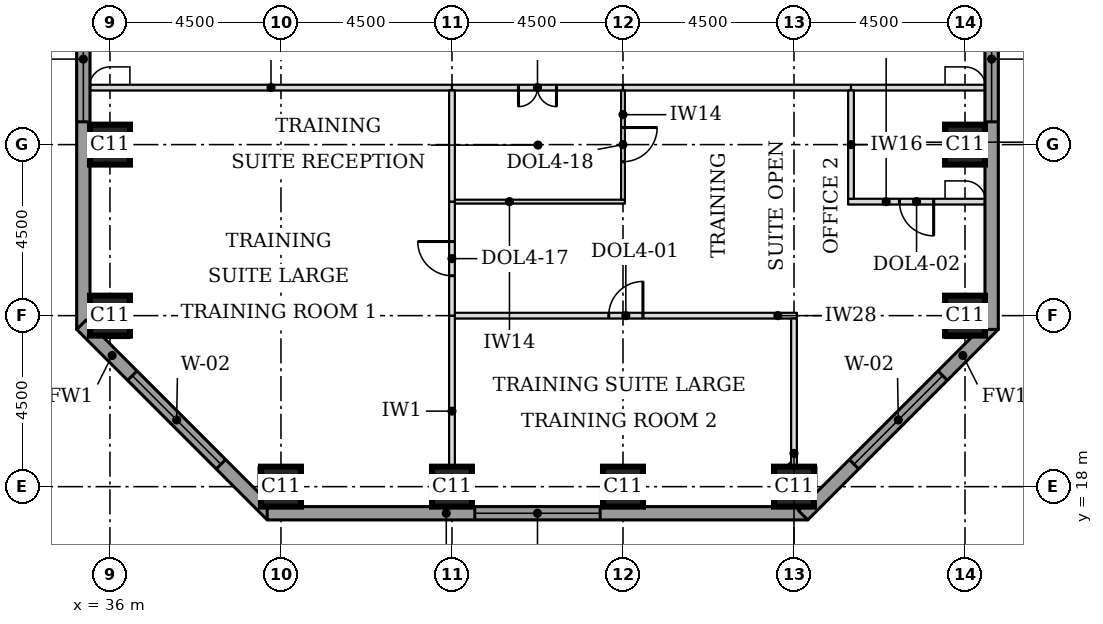
"""IFC4 building model, lengths in metres.
Left out: names, types, materials, properties, quantities, classifications, styles, units other than length and angle.
Written with IfcOpenShell. Run it as: python <this file> out.ifc"""

import sys

from ifc_helpers import new_model, si_unit, direction, frame, frame_2d, origin, origin_2d, place, context, subcontext, project, spatial, rectangle, extrude, element, fill, save


model = new_model("IFC4")
c1 = context("Model", 3, precision=1e-05, world=origin(), true_north=direction((0.0, 1.0)))
c2 = subcontext(c1, "Body", "Model", "MODEL_VIEW")
j1 = project(units=[si_unit("LENGTHUNIT", "METRE"), si_unit("PLANEANGLEUNIT", "RADIAN")], contexts=[c1])
p1 = place(None, origin())
s1 = spatial("IfcSite", under=j1, at=p1, CompositionType="ELEMENT")
p2 = place(p1, origin())
s2 = spatial("IfcBuilding", under=s1, at=p2, CompositionType="ELEMENT")
p3 = place(p2, frame((0.0, 0.0, 101.1)))
s3 = spatial("IfcBuildingStorey", under=s2, at=p3, CompositionType="ELEMENT", Elevation=101.1)
for number, where, z_axis, x_axis in (
    (1, (40.5, 18.0, 0.0), (0.0, 0.0, 1.0), (1.0, 0.0, 0.0)),
    (2, (45.0, 18.0, 0.0), (0.0, 0.0, 1.0), (1.0, 0.0, 0.0)),
    (3, (49.5, 18.0, 0.0), (0.0, 0.0, 1.0), (1.0, 0.0, 0.0)),
    (4, (54.0, 18.0, 0.0), (0.0, 0.0, 1.0), (1.0, 0.0, 0.0)),
    (5, (36.0, 22.5, 0.0), (0.0, 0.0, 1.0), (1.0, 0.0, 0.0)),
    (6, (58.5, 22.5, 0.0), (0.0, 0.0, 1.0), (1.0, 0.0, 0.0)),
    (7, (36.0, 27.0, 0.0), (0.0, 0.0, 1.0), (1.0, 0.0, 0.0)),
    (8, (58.5, 27.0, 0.0), (0.0, 0.0, 1.0), (1.0, 0.0, 0.0)),
):
    element("IfcColumn", number, at=place(p3, frame(where, z_axis=z_axis, x_axis=x_axis)), inside=s3, PredefinedType="COLUMN", context=c2, shape_type="SweptSolid", body=[
        extrude(rectangle(XDim=1.05, YDim=1.05, at=origin_2d()), origin(), (0.0, 0.0, 1.0), 3.7),
    ])
p4 = place(p3, frame((35.3, 39.975, 0.0), z_axis=(0.0, 0.0, 1.0), x_axis=(0.0, -1.0, 0.0)))
e9 = element("IfcWall", 9, at=p4, inside=s3, PredefinedType="STANDARD", context=c2, shape_type="SweptSolid", body=[
    extrude(rectangle(XDim=17.837, YDim=0.35, at=frame_2d((8.919, 0.0))), origin(), (0.0, 0.0, 1.0), 3.525),
])
p5 = place(p4, frame((0.5, 0.0, 0.9)))
e10 = element("IfcOpeningElement", 10, at=p5, cuts=e9, PredefinedType="OPENING", context=c2, shape_type="SweptSolid", body=[
    extrude(rectangle(XDim=3.3, YDim=1.9, at=frame_2d((1.65, 0.95))), frame((0.0, 0.185, 0.0), z_axis=(0.0, -1.0, 0.0), x_axis=(1.0, 0.0, 0.0)), (0.0, 0.0, 1.0), 0.37),
])
p6 = place(p4, frame((9.075, 0.0, 0.9)))
e11 = element("IfcOpeningElement", 11, at=p6, cuts=e9, PredefinedType="OPENING", context=c2, shape_type="SweptSolid", body=[
    extrude(rectangle(XDim=3.3, YDim=1.9, at=frame_2d((1.65, 0.95))), frame((0.0, 0.185, 0.0), z_axis=(0.0, -1.0, 0.0), x_axis=(1.0, 0.0, 0.0)), (0.0, 0.0, 1.0), 0.37),
])
p7 = place(p3, frame((35.249, 22.261, 0.0), z_axis=(0.0, 0.0, 1.0), x_axis=(0.707106781187, -0.707106781187, 0.0)))
e12 = element("IfcWall", 12, at=p7, inside=s3, PredefinedType="STANDARD", context=c2, shape_type="SweptSolid", body=[
    extrude(rectangle(XDim=7.089, YDim=0.35, at=frame_2d((3.544, 0.0))), origin(), (0.0, 0.0, 1.0), 3.525),
])
p8 = place(p7, frame((1.894, 0.0, 0.9)))
e13 = element("IfcOpeningElement", 13, at=p8, cuts=e12, PredefinedType="OPENING", context=c2, shape_type="SweptSolid", body=[
    extrude(rectangle(XDim=3.3, YDim=1.9, at=frame_2d((1.65, 0.95))), frame((0.0, 0.185, 0.0), z_axis=(0.0, -1.0, 0.0), x_axis=(1.0, 0.0, 0.0)), (0.0, 0.0, 1.0), 0.37),
])
p9 = place(p3, frame((40.138, 17.3, 0.0), z_axis=(0.0, 0.0, 1.0), x_axis=(1.0, 0.0, 0.0)))
e14 = element("IfcWall", 14, at=p9, inside=s3, PredefinedType="STANDARD", context=c2, shape_type="SweptSolid", body=[
    extrude(rectangle(XDim=14.225, YDim=0.35, at=frame_2d((7.112, 0.0))), origin(), (0.0, 0.0, 1.0), 3.525),
])
p10 = place(p9, frame((5.462, 0.0, 0.9)))
e15 = element("IfcOpeningElement", 15, at=p10, cuts=e14, PredefinedType="OPENING", context=c2, shape_type="SweptSolid", body=[
    extrude(rectangle(XDim=3.3, YDim=1.9, at=frame_2d((1.65, 0.95))), frame((0.0, 0.185, 0.0), z_axis=(0.0, -1.0, 0.0), x_axis=(1.0, 0.0, 0.0)), (0.0, 0.0, 1.0), 0.37),
])
p11 = place(p3, frame((54.239, 17.249, 0.0), z_axis=(0.0, 0.0, 1.0), x_axis=(0.707106781187, 0.707106781187, 0.0)))
e16 = element("IfcWall", 16, at=p11, inside=s3, PredefinedType="STANDARD", context=c2, shape_type="SweptSolid", body=[
    extrude(rectangle(XDim=7.089, YDim=0.35, at=frame_2d((3.544, 0.0))), origin(), (0.0, 0.0, 1.0), 3.525),
])
p12 = place(p11, frame((1.894, 0.0, 0.9)))
e17 = element("IfcOpeningElement", 17, at=p12, cuts=e16, PredefinedType="OPENING", context=c2, shape_type="SweptSolid", body=[
    extrude(rectangle(XDim=3.3, YDim=1.9, at=frame_2d((1.65, 0.95))), frame((0.0, 0.185, 0.0), z_axis=(0.0, -1.0, 0.0), x_axis=(1.0, 0.0, 0.0)), (0.0, 0.0, 1.0), 0.37),
])
p13 = place(p3, frame((59.2, 22.138, 0.0), z_axis=(0.0, 0.0, 1.0), x_axis=(0.0, 1.0, 0.0)))
e18 = element("IfcWall", 18, at=p13, inside=s3, PredefinedType="STANDARD", context=c2, shape_type="SweptSolid", body=[
    extrude(rectangle(XDim=17.837, YDim=0.35, at=frame_2d((8.919, 0.0))), origin(), (0.0, 0.0, 1.0), 3.525),
])
p14 = place(p13, frame((5.462, 0.0, 0.9)))
e19 = element("IfcOpeningElement", 19, at=p14, cuts=e18, PredefinedType="OPENING", context=c2, shape_type="SweptSolid", body=[
    extrude(rectangle(XDim=3.3, YDim=1.9, at=frame_2d((1.65, 0.95))), frame((0.0, 0.185, 0.0), z_axis=(0.0, -1.0, 0.0), x_axis=(1.0, 0.0, 0.0)), (0.0, 0.0, 1.0), 0.37),
])
p15 = place(p13, frame((14.037, 0.0, 0.9)))
e20 = element("IfcOpeningElement", 20, at=p15, cuts=e18, PredefinedType="OPENING", context=c2, shape_type="SweptSolid", body=[
    extrude(rectangle(XDim=3.3, YDim=1.9, at=frame_2d((1.65, 0.95))), frame((0.0, 0.185, 0.0), z_axis=(0.0, -1.0, 0.0), x_axis=(1.0, 0.0, 0.0)), (0.0, 0.0, 1.0), 0.37),
])
p16 = place(p3, frame((45.075, 22.5, 0.0), z_axis=(0.0, 0.0, 1.0), x_axis=(1.0, 0.0, 0.0)))
e21 = element("IfcWall", 21, at=p16, inside=s3, PredefinedType="PARTITIONING", context=c2, shape_type="SweptSolid", body=[
    extrude(rectangle(XDim=9.0, YDim=0.15, at=frame_2d((4.5, 0.0))), origin(), (0.0, 0.0, 1.0), 2.55),
])
p17 = place(p16, frame((4.05, 0.0, 0.0)))
e22 = element("IfcOpeningElement", 22, at=p17, cuts=e21, PredefinedType="OPENING", context=c2, shape_type="SweptSolid", body=[
    extrude(rectangle(XDim=0.9, YDim=2.1, at=frame_2d((0.45, 1.05))), frame((0.0, 0.085, 0.0), z_axis=(0.0, -1.0, 0.0), x_axis=(1.0, 0.0, 0.0)), (0.0, 0.0, 1.0), 0.17),
])
p18 = place(p3, frame((45.075, 25.5, 0.0), z_axis=(0.0, 0.0, 1.0), x_axis=(1.0, 0.0, 0.0)))
e23 = element("IfcWall", 23, at=p18, inside=s3, PredefinedType="PARTITIONING", context=c2, shape_type="SweptSolid", body=[
    extrude(rectangle(XDim=4.475, YDim=0.1, at=frame_2d((2.238, 0.0))), origin(), (0.0, 0.0, 1.0), 3.55),
])
p19 = place(p3, frame((55.425, 25.5, 0.0), z_axis=(0.0, 0.0, 1.0), x_axis=(1.0, 0.0, 0.0)))
e24 = element("IfcWall", 24, at=p19, inside=s3, PredefinedType="PARTITIONING", context=c2, shape_type="SweptSolid", body=[
    extrude(rectangle(XDim=3.6, YDim=0.15, at=frame_2d((1.8, 0.0))), origin(), (0.0, 0.0, 1.0), 3.55),
])
p20 = place(p19, frame((1.35, 0.0, 0.0)))
e25 = element("IfcOpeningElement", 25, at=p20, cuts=e24, PredefinedType="OPENING", context=c2, shape_type="SweptSolid", body=[
    extrude(rectangle(XDim=0.9, YDim=2.1, at=frame_2d((0.45, 1.05))), frame((0.0, 0.085, 0.0), z_axis=(0.0, -1.0, 0.0), x_axis=(1.0, 0.0, 0.0)), (0.0, 0.0, 1.0), 0.17),
])
p21 = place(p3, frame((35.475, 28.5, 0.0), z_axis=(0.0, 0.0, 1.0), x_axis=(1.0, 0.0, 0.0)))
e26 = element("IfcWall", 26, at=p21, inside=s3, PredefinedType="PARTITIONING", context=c2, shape_type="SweptSolid", body=[
    extrude(rectangle(XDim=9.525, YDim=0.15, at=frame_2d((4.762, 0.0))), origin(), (0.0, 0.0, 1.0), 3.55),
])
p22 = place(p3, frame((45.0, 28.5, 0.0), z_axis=(0.0, 0.0, 1.0), x_axis=(1.0, 0.0, 0.0)))
e27 = element("IfcWall", 27, at=p22, inside=s3, PredefinedType="PARTITIONING", context=c2, shape_type="SweptSolid", body=[
    extrude(rectangle(XDim=4.5, YDim=0.15, at=frame_2d((2.25, 0.0))), origin(), (0.0, 0.0, 1.0), 3.55),
])
p23 = place(p22, frame((1.75, 0.0, 0.0)))
e28 = element("IfcOpeningElement", 28, at=p23, cuts=e27, PredefinedType="OPENING", context=c2, shape_type="SweptSolid", body=[
    extrude(rectangle(XDim=1.0, YDim=2.1, at=frame_2d((0.5, 1.05))), frame((0.0, 0.085, 0.0), z_axis=(0.0, -1.0, 0.0), x_axis=(1.0, 0.0, 0.0)), (0.0, 0.0, 1.0), 0.17),
])
p24 = place(p3, frame((49.5, 28.5, 0.0), z_axis=(0.0, 0.0, 1.0), x_axis=(1.0, 0.0, 0.0)))
e29 = element("IfcWall", 29, at=p24, inside=s3, PredefinedType="PARTITIONING", context=c2, shape_type="SweptSolid", body=[
    extrude(rectangle(XDim=6.0, YDim=0.15, at=frame_2d((3.0, 0.0))), origin(), (0.0, 0.0, 1.0), 3.55),
])
p25 = place(p3, frame((55.5, 28.5, 0.0), z_axis=(0.0, 0.0, 1.0), x_axis=(1.0, 0.0, 0.0)))
e30 = element("IfcWall", 30, at=p25, inside=s3, PredefinedType="PARTITIONING", context=c2, shape_type="SweptSolid", body=[
    extrude(rectangle(XDim=3.525, YDim=0.15, at=frame_2d((1.762, 0.0))), origin(), (0.0, 0.0, 1.0), 3.55),
])
p26 = place(p3, frame((45.0, 17.475, 0.0), z_axis=(0.0, 0.0, 1.0), x_axis=(0.0, 1.0, 0.0)))
e31 = element("IfcWall", 31, at=p26, inside=s3, PredefinedType="PARTITIONING", context=c2, shape_type="SweptSolid", body=[
    extrude(rectangle(XDim=5.025, YDim=0.15, at=frame_2d((2.512, 0.0))), origin(), (0.0, 0.0, 1.0), 3.55),
])
p27 = place(p3, frame((54.0, 18.525, 0.0), z_axis=(0.0, 0.0, 1.0), x_axis=(0.0, 1.0, 0.0)))
e32 = element("IfcWall", 32, at=p27, inside=s3, PredefinedType="PARTITIONING", context=c2, shape_type="SweptSolid", body=[
    extrude(rectangle(XDim=3.9, YDim=0.15, at=frame_2d((1.95, 0.0))), origin(), (0.0, 0.0, 1.0), 3.55),
])
p28 = place(p3, frame((45.0, 22.5, 0.0), z_axis=(0.0, 0.0, 1.0), x_axis=(0.0, 1.0, 0.0)))
e33 = element("IfcWall", 33, at=p28, inside=s3, PredefinedType="PARTITIONING", context=c2, shape_type="SweptSolid", body=[
    extrude(rectangle(XDim=3.0, YDim=0.15, at=frame_2d((1.5, 0.0))), origin(), (0.0, 0.0, 1.0), 3.55),
])
p29 = place(p28, frame((1.05, 0.0, 0.0)))
e34 = element("IfcOpeningElement", 34, at=p29, cuts=e33, PredefinedType="OPENING", context=c2, shape_type="SweptSolid", body=[
    extrude(rectangle(XDim=0.9, YDim=2.1, at=frame_2d((0.45, 1.05))), frame((0.0, 0.085, 0.0), z_axis=(0.0, -1.0, 0.0), x_axis=(1.0, 0.0, 0.0)), (0.0, 0.0, 1.0), 0.17),
])
p30 = place(p3, frame((45.0, 25.5, 0.0), z_axis=(0.0, 0.0, 1.0), x_axis=(0.0, 1.0, 0.0)))
e35 = element("IfcWall", 35, at=p30, inside=s3, PredefinedType="PARTITIONING", context=c2, shape_type="SweptSolid", body=[
    extrude(rectangle(XDim=2.925, YDim=0.15, at=frame_2d((1.462, 0.0))), origin(), (0.0, 0.0, 1.0), 3.55),
])
p31 = place(p3, frame((49.5, 25.55, 0.0), z_axis=(0.0, 0.0, 1.0), x_axis=(0.0, 1.0, 0.0)))
e36 = element("IfcWall", 36, at=p31, inside=s3, PredefinedType="PARTITIONING", context=c2, shape_type="SweptSolid", body=[
    extrude(rectangle(XDim=2.875, YDim=0.1, at=frame_2d((1.438, 0.0))), origin(), (0.0, 0.0, 1.0), 3.55),
])
p32 = place(p31, frame((1.0, 0.0, 0.0)))
e37 = element("IfcOpeningElement", 37, at=p32, cuts=e36, PredefinedType="OPENING", context=c2, shape_type="SweptSolid", body=[
    extrude(rectangle(XDim=0.9, YDim=2.1, at=frame_2d((0.45, 1.05))), frame((0.0, 0.06, 0.0), z_axis=(0.0, -1.0, 0.0), x_axis=(1.0, 0.0, 0.0)), (0.0, 0.0, 1.0), 0.12),
])
p33 = place(p3, frame((55.5, 25.575, 0.0), z_axis=(0.0, 0.0, 1.0), x_axis=(0.0, 1.0, 0.0)))
e38 = element("IfcWall", 38, at=p33, inside=s3, PredefinedType="PARTITIONING", context=c2, shape_type="SweptSolid", body=[
    extrude(rectangle(XDim=2.85, YDim=0.15, at=frame_2d((1.425, 0.0))), origin(), (0.0, 0.0, 1.0), 3.55),
])
p34 = place(p6, origin())
e39 = element("IfcWindow", 39, at=p34, inside=s3, PartitioningType="SINGLE_PANEL", PredefinedType="WINDOW", context=c2, shape_type="SweptSolid", body=[
    extrude(rectangle(XDim=3.3, YDim=1.9, at=frame_2d((1.65, 0.95))), frame((0.0, 0.085, 0.0), z_axis=(0.0, -1.0, 0.0), x_axis=(1.0, 0.0, 0.0)), (0.0, 0.0, 1.0), 0.06),
])
fill(e11, e39)
p35 = place(p8, origin())
e40 = element("IfcWindow", 40, at=p35, inside=s3, PartitioningType="SINGLE_PANEL", PredefinedType="WINDOW", context=c2, shape_type="SweptSolid", body=[
    extrude(rectangle(XDim=3.3, YDim=1.9, at=frame_2d((1.65, 0.95))), frame((0.0, 0.085, 0.0), z_axis=(0.0, -1.0, 0.0), x_axis=(1.0, 0.0, 0.0)), (0.0, 0.0, 1.0), 0.06),
])
fill(e13, e40)
p36 = place(p10, origin())
e41 = element("IfcWindow", 41, at=p36, inside=s3, PartitioningType="SINGLE_PANEL", PredefinedType="WINDOW", context=c2, shape_type="SweptSolid", body=[
    extrude(rectangle(XDim=3.3, YDim=1.9, at=frame_2d((1.65, 0.95))), frame((0.0, 0.085, 0.0), z_axis=(0.0, -1.0, 0.0), x_axis=(1.0, 0.0, 0.0)), (0.0, 0.0, 1.0), 0.06),
])
fill(e15, e41)
p37 = place(p12, origin())
e42 = element("IfcWindow", 42, at=p37, inside=s3, PartitioningType="SINGLE_PANEL", PredefinedType="WINDOW", context=c2, shape_type="SweptSolid", body=[
    extrude(rectangle(XDim=3.3, YDim=1.9, at=frame_2d((1.65, 0.95))), frame((0.0, 0.085, 0.0), z_axis=(0.0, -1.0, 0.0), x_axis=(1.0, 0.0, 0.0)), (0.0, 0.0, 1.0), 0.06),
])
fill(e17, e42)
p38 = place(p14, origin())
e43 = element("IfcWindow", 43, at=p38, inside=s3, PartitioningType="SINGLE_PANEL", PredefinedType="WINDOW", context=c2, shape_type="SweptSolid", body=[
    extrude(rectangle(XDim=3.3, YDim=1.9, at=frame_2d((1.65, 0.95))), frame((0.0, 0.085, 0.0), z_axis=(0.0, -1.0, 0.0), x_axis=(1.0, 0.0, 0.0)), (0.0, 0.0, 1.0), 0.06),
])
fill(e19, e43)
p39 = place(p23, frame((1.0, 0.0, 0.0), z_axis=(0.0, 0.0, 1.0), x_axis=(-1.0, 0.0, 0.0)))
e44 = element("IfcDoor", 44, at=p39, inside=s3, OperationType="DOUBLE_DOOR_SINGLE_SWING", PredefinedType="DOOR", context=c2, shape_type="SweptSolid", body=[
    extrude(rectangle(XDim=1.0, YDim=2.1, at=frame_2d((0.5, 1.05))), frame((0.0, 0.025, 0.0), z_axis=(0.0, -1.0, 0.0), x_axis=(1.0, 0.0, 0.0)), (0.0, 0.0, 1.0), 0.05),
])
fill(e28, e44)
p40 = place(p32, frame((0.9, 0.0, 0.0), z_axis=(0.0, 0.0, 1.0), x_axis=(-1.0, 0.0, 0.0)))
e45 = element("IfcDoor", 45, at=p40, inside=s3, OperationType="SINGLE_SWING_LEFT", PredefinedType="DOOR", context=c2, shape_type="SweptSolid", body=[
    extrude(rectangle(XDim=0.9, YDim=2.1, at=frame_2d((0.45, 1.05))), frame((0.0, 0.025, 0.0), z_axis=(0.0, -1.0, 0.0), x_axis=(1.0, 0.0, 0.0)), (0.0, 0.0, 1.0), 0.05),
])
fill(e37, e45)
p41 = place(p20, frame((0.9, 0.0, 0.0), z_axis=(0.0, 0.0, 1.0), x_axis=(-1.0, 0.0, 0.0)))
e46 = element("IfcDoor", 46, at=p41, inside=s3, OperationType="SINGLE_SWING_LEFT", PredefinedType="DOOR", context=c2, shape_type="SweptSolid", body=[
    extrude(rectangle(XDim=0.9, YDim=2.1, at=frame_2d((0.45, 1.05))), frame((0.0, 0.025, 0.0), z_axis=(0.0, -1.0, 0.0), x_axis=(1.0, 0.0, 0.0)), (0.0, 0.0, 1.0), 0.05),
])
fill(e25, e46)
p42 = place(p29, origin())
e47 = element("IfcDoor", 47, at=p42, inside=s3, OperationType="SINGLE_SWING_RIGHT", PredefinedType="DOOR", context=c2, shape_type="SweptSolid", body=[
    extrude(rectangle(XDim=0.9, YDim=2.1, at=frame_2d((0.45, 1.05))), frame((0.0, 0.025, 0.0), z_axis=(0.0, -1.0, 0.0), x_axis=(1.0, 0.0, 0.0)), (0.0, 0.0, 1.0), 0.05),
])
fill(e34, e47)
p43 = place(p17, origin())
e48 = element("IfcDoor", 48, at=p43, inside=s3, OperationType="SINGLE_SWING_RIGHT", PredefinedType="DOOR", context=c2, shape_type="SweptSolid", body=[
    extrude(rectangle(XDim=0.9, YDim=2.1, at=frame_2d((0.45, 1.05))), frame((0.0, 0.025, 0.0), z_axis=(0.0, -1.0, 0.0), x_axis=(1.0, 0.0, 0.0)), (0.0, 0.0, 1.0), 0.05),
])
fill(e22, e48)
save(model, sys.argv[1])
